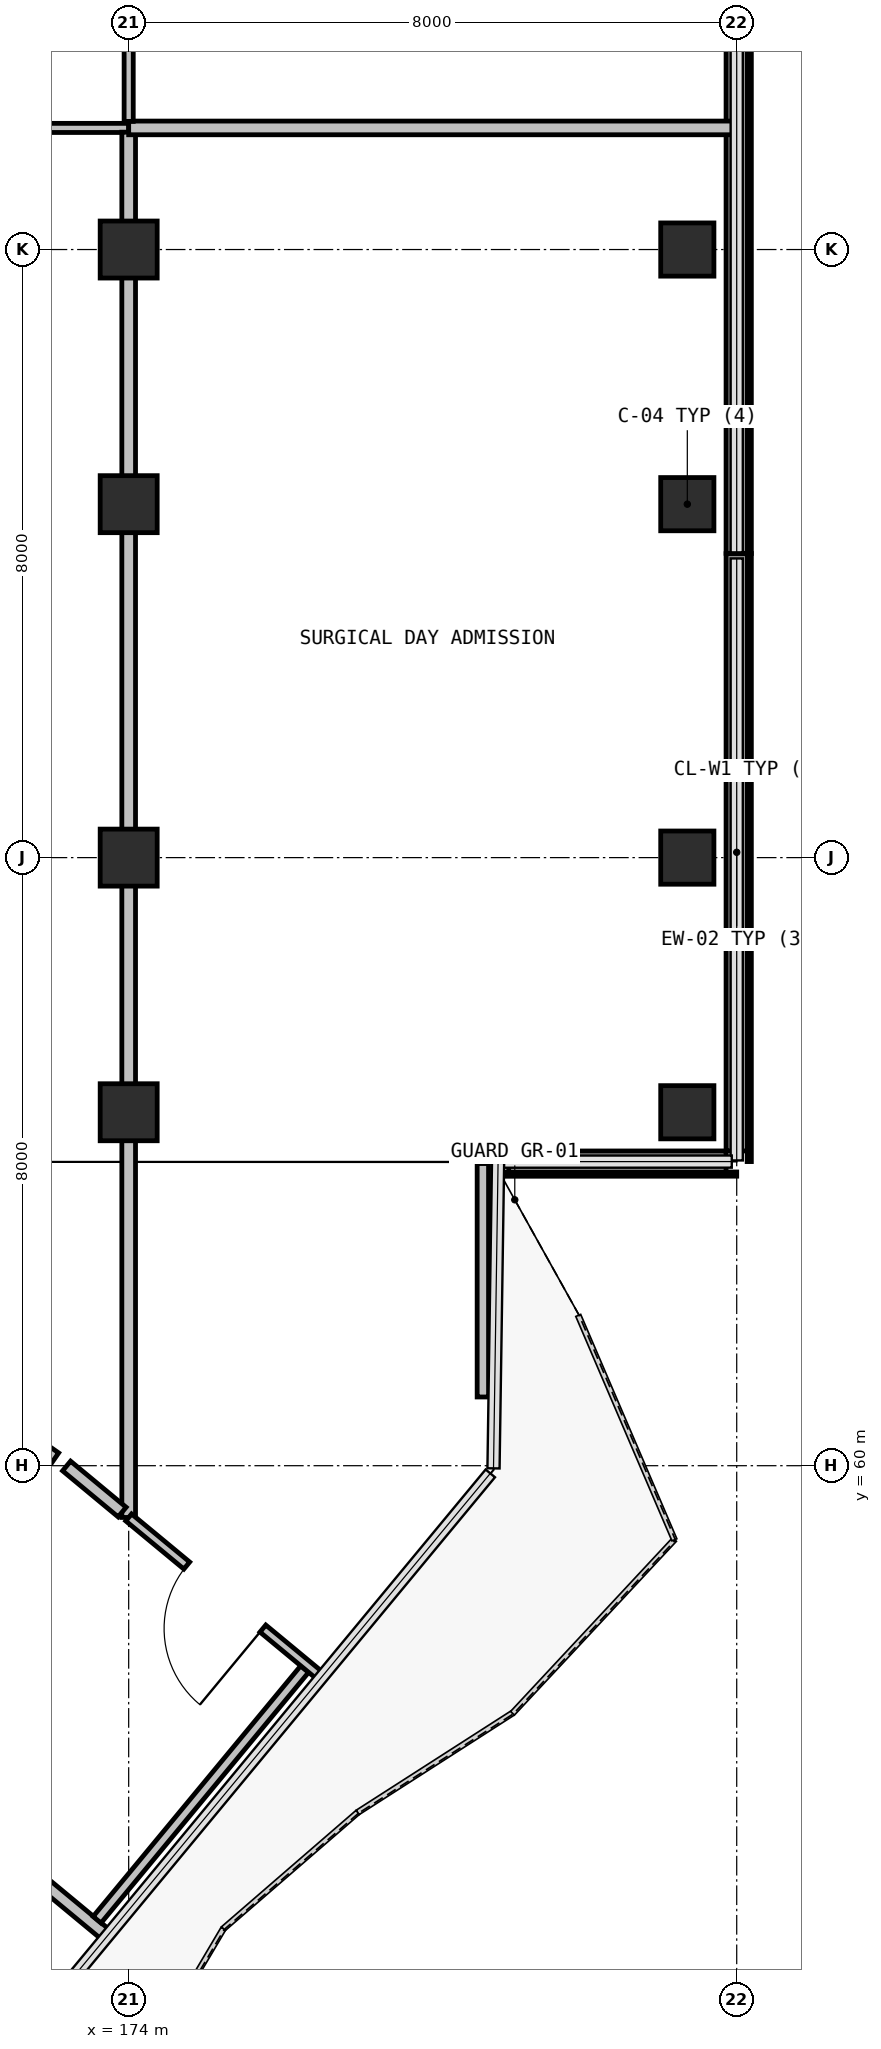
"""IFC4 building model, lengths in metres.
Left out: names, types, materials, properties, quantities, classifications, styles, units other than length and angle.
Written with IfcOpenShell. Run it as: python <this file> out.ifc"""

import sys

from ifc_helpers import new_model, si_unit, direction, frame, frame_2d, origin, origin_2d, place, context, subcontext, project, spatial, rectangle, extrude, element, fill, save


model = new_model("IFC4")
c1 = context("Model", 3, precision=1e-05, world=origin(), true_north=direction((0.0, 1.0)))
c2 = subcontext(c1, "Body", "Model", "MODEL_VIEW")
j1 = project(units=[si_unit("LENGTHUNIT", "METRE"), si_unit("PLANEANGLEUNIT", "RADIAN")], contexts=[c1])
p1 = place(None, origin())
s1 = spatial("IfcSite", under=j1, at=p1, CompositionType="ELEMENT")
p2 = place(p1, origin())
s2 = spatial("IfcBuilding", under=s1, at=p2, CompositionType="ELEMENT")
p3 = place(p2, frame((0.0, 0.0, 10.2)))
s3 = spatial("IfcBuildingStorey", under=s2, at=p3, CompositionType="ELEMENT", Elevation=10.2)
for number, where, z_axis, x_axis in (
    (1, (174.0, 64.65, 0.0), (0.0, 0.0, 1.0), (1.0, 0.0, 0.0)),
    (2, (174.0, 68.0, 0.0), (0.0, 0.0, 1.0), (1.0, 0.0, 0.0)),
    (3, (174.0, 72.65, 0.0), (0.0, 0.0, 1.0), (1.0, 0.0, 0.0)),
    (4, (174.0, 76.0, 0.0), (0.0, 0.0, 1.0), (1.0, 0.0, 0.0)),
):
    element("IfcColumn", number, at=place(p3, frame(where, z_axis=z_axis, x_axis=x_axis)), inside=s3, PredefinedType="COLUMN", context=c2, shape_type="SweptSolid", body=[
        extrude(rectangle(XDim=0.75, YDim=0.75, at=origin_2d()), origin(), (0.0, 0.0, 1.0), 4.8),
    ])
for number, where, z_axis, x_axis in (
    (5, (181.35, 64.65, 0.0), (0.0, 0.0, 1.0), (1.0, 0.0, 0.0)),
    (6, (181.35, 68.0, 0.0), (0.0, 0.0, 1.0), (1.0, 0.0, 0.0)),
    (7, (181.35, 72.65, 0.0), (0.0, 0.0, 1.0), (1.0, 0.0, 0.0)),
    (8, (181.35, 76.0, 0.0), (0.0, 0.0, 1.0), (1.0, 0.0, 0.0)),
):
    element("IfcColumn", number, at=place(p3, frame(where, z_axis=z_axis, x_axis=x_axis)), inside=s3, PredefinedType="COLUMN", context=c2, shape_type="SweptSolid", body=[
        extrude(rectangle(XDim=0.7, YDim=0.7, at=origin_2d()), origin(), (0.0, 0.0, 1.0), 4.8),
    ])
p4 = place(p3, frame((182.0, 79.999, 0.0), z_axis=(0.0, 0.0, 1.0), x_axis=(0.0, -1.0, 0.0)))
e9 = element("IfcWall", 9, at=p4, inside=s3, PredefinedType="SOLIDWALL", context=c2, shape_type="SweptSolid", body=[
    extrude(rectangle(XDim=7.996, YDim=0.28, at=frame_2d((3.998, 0.0))), origin(), (0.0, 0.0, 1.0), 0.94),
])
p5 = place(p3, frame((182.0, 71.999, 0.0), z_axis=(0.0, 0.0, 1.0), x_axis=(0.0, -1.0, 0.0)))
e10 = element("IfcWall", 10, at=p5, inside=s3, PredefinedType="SOLIDWALL", context=c2, shape_type="SweptSolid", body=[
    extrude(rectangle(XDim=7.858, YDim=0.28, at=frame_2d((3.929, 0.0))), origin(), (0.0, 0.0, 1.0), 0.94),
])
p6 = place(p3, frame((181.86, 64.001, 0.0), z_axis=(0.0, 0.0, 1.0), x_axis=(-0.999999941708, -0.000341442575, 0.0)))
e11 = element("IfcWall", 11, at=p6, inside=s3, PredefinedType="SOLIDWALL", context=c2, shape_type="SweptSolid", body=[
    extrude(rectangle(XDim=2.86, YDim=0.28, at=frame_2d((1.43, 0.0))), origin(), (0.0, 0.0, 1.0), 0.94),
])
p7 = place(p3, frame((170.434, 56.533, 0.0), z_axis=(0.0, 0.0, 1.0), x_axis=(0.770184287696, -0.637821419353, 0.0)))
e12 = element("IfcWall", 12, at=p7, inside=s3, PredefinedType="PARTITIONING", context=c2, shape_type="SweptSolid", body=[
    extrude(rectangle(XDim=4.253, YDim=0.165, at=frame_2d((2.127, 0.0))), origin(), (0.0, 0.0, 1.0), 4.46),
])
p8 = place(p7, frame((1.402, 0.0, 0.0)))
e13 = element("IfcOpeningElement", 13, at=p8, cuts=e12, PredefinedType="OPENING", context=c2, shape_type="SweptSolid", body=[
    extrude(rectangle(XDim=1.45, YDim=2.15, at=frame_2d((0.725, 1.075))), frame((0.0, 0.093, 0.0), z_axis=(0.0, -1.0, 0.0), x_axis=(1.0, 0.0, 0.0)), (0.0, 0.0, 1.0), 0.185),
])
p9 = place(p3, frame((173.036, 60.107, 0.0), z_axis=(0.0, 0.0, 1.0), x_axis=(-0.820574971601, 0.571538901547, 0.0)))
e14 = element("IfcWall", 14, at=p9, inside=s3, PredefinedType="PARTITIONING", context=c2, shape_type="SweptSolid", body=[
    extrude(rectangle(XDim=4.357, YDim=0.15, at=frame_2d((2.178, 0.0))), origin(), (0.0, 0.0, 1.0), 4.46),
])
p10 = place(p9, frame((1.578, 0.0, 0.0)))
e15 = element("IfcOpeningElement", 15, at=p10, cuts=e14, PredefinedType="OPENING", context=c2, shape_type="SweptSolid", body=[
    extrude(rectangle(XDim=1.2, YDim=2.15, at=frame_2d((0.6, 1.075))), frame((0.0, 0.085, 0.0), z_axis=(0.0, -1.0, 0.0), x_axis=(1.0, 0.0, 0.0)), (0.0, 0.0, 1.0), 0.17),
])
p11 = place(p3, frame((165.6, 77.6, 0.0), z_axis=(0.0, 0.0, 1.0), x_axis=(1.0, 0.0, 0.0)))
e16 = element("IfcWall", 16, at=p11, inside=s3, PredefinedType="PARTITIONING", context=c2, shape_type="SweptSolid", body=[
    extrude(rectangle(XDim=8.4, YDim=0.12, at=frame_2d((4.2, 0.0))), origin(), (0.0, 0.0, 1.0), 4.46),
])
p12 = place(p3, frame((174.0, 77.544, 0.0), z_axis=(0.0, 0.0, 1.0), x_axis=(0.0, -1.0, 0.0)))
e17 = element("IfcWall", 17, at=p12, inside=s3, PredefinedType="PARTITIONING", context=c2, shape_type="SweptSolid", body=[
    extrude(rectangle(XDim=18.225, YDim=0.18, at=frame_2d((9.112, 0.0))), origin(), (0.0, 0.0, 1.0), 3.81),
])
p13 = place(p3, frame((173.914, 59.39, 0.0), z_axis=(0.0, 0.0, 1.0), x_axis=(-0.769736392055, 0.638361877579, 0.0)))
e18 = element("IfcWall", 18, at=p13, inside=s3, PredefinedType="PARTITIONING", context=c2, shape_type="SweptSolid", body=[
    extrude(rectangle(XDim=0.95, YDim=0.165, at=frame_2d((0.475, 0.0))), origin(), (0.0, 0.0, 1.0), 4.46),
])
p14 = place(p3, frame((178.66, 63.975, 0.0), z_axis=(0.0, 0.0, 1.0), x_axis=(0.0, -1.0, 0.0)))
e19 = element("IfcWall", 19, at=p14, inside=s3, PredefinedType="PARTITIONING", context=c2, shape_type="SweptSolid", body=[
    extrude(rectangle(XDim=3.071, YDim=0.15, at=frame_2d((1.536, 0.0))), origin(), (0.0, 0.0, 1.0), 4.46),
])
p15 = place(p3, frame((173.584, 54.026, 0.0), z_axis=(0.0, 0.0, 1.0), x_axis=(0.637775393062, 0.770222401651, 0.0)))
e20 = element("IfcWall", 20, at=p15, inside=s3, PredefinedType="PARTITIONING", context=c2, shape_type="SweptSolid", body=[
    extrude(rectangle(XDim=4.282, YDim=0.135, at=frame_2d((2.141, 0.0))), origin(), (0.0, 0.0, 1.0), 4.46),
])
p16 = place(p3, frame((176.53, 57.225, 0.0), z_axis=(0.0, 0.0, 1.0), x_axis=(-0.770367879737, 0.637599662695, 0.0)))
e21 = element("IfcWall", 21, at=p16, inside=s3, PredefinedType="PARTITIONING", context=c2, shape_type="SweptSolid", body=[
    extrude(rectangle(XDim=3.284, YDim=0.12, at=frame_2d((1.642, 0.0))), origin(), (0.0, 0.0, 1.0), 4.46),
])
p17 = place(p16, frame((0.992, 0.0, 0.0)))
e22 = element("IfcOpeningElement", 22, at=p17, cuts=e21, PredefinedType="OPENING", context=c2, shape_type="SweptSolid", body=[
    extrude(rectangle(XDim=1.3, YDim=2.15, at=frame_2d((0.65, 1.075))), frame((0.0, 0.07, 0.0), z_axis=(0.0, -1.0, 0.0), x_axis=(1.0, 0.0, 0.0)), (0.0, 0.0, 1.0), 0.14),
])
p18 = place(p3, frame((174.0, 77.6, 0.0), z_axis=(0.0, 0.0, 1.0), x_axis=(1.0, 0.0, 0.0)))
e23 = element("IfcWall", 23, at=p18, inside=s3, PredefinedType="PARTITIONING", context=c2, shape_type="SweptSolid", body=[
    extrude(rectangle(XDim=7.958, YDim=0.18, at=frame_2d((3.979, 0.0))), origin(), (0.0, 0.0, 1.0), 4.46),
])
p19 = place(p3, frame((174.0, 105.376, 0.0), z_axis=(0.0, 0.0, 1.0), x_axis=(0.0, -1.0, 0.0)))
e24 = element("IfcWall", 24, at=p19, inside=s3, PredefinedType="PARTITIONING", context=c2, shape_type="SweptSolid", body=[
    extrude(rectangle(XDim=27.69, YDim=0.12, at=frame_2d((13.845, 0.0))), origin(), (0.0, 0.0, 1.0), 3.81),
])
p20 = place(p17, origin())
e25 = element("IfcDoor", 25, at=p20, inside=s3, OperationType="SINGLE_SWING_LEFT", PredefinedType="DOOR", context=c2, shape_type="SweptSolid", body=[
    extrude(rectangle(XDim=1.3, YDim=2.15, at=frame_2d((0.65, 1.075))), frame((0.0, 0.025, 0.0), z_axis=(0.0, -1.0, 0.0), x_axis=(1.0, 0.0, 0.0)), (0.0, 0.0, 1.0), 0.05),
])
fill(e22, e25)
save(model, sys.argv[1])
